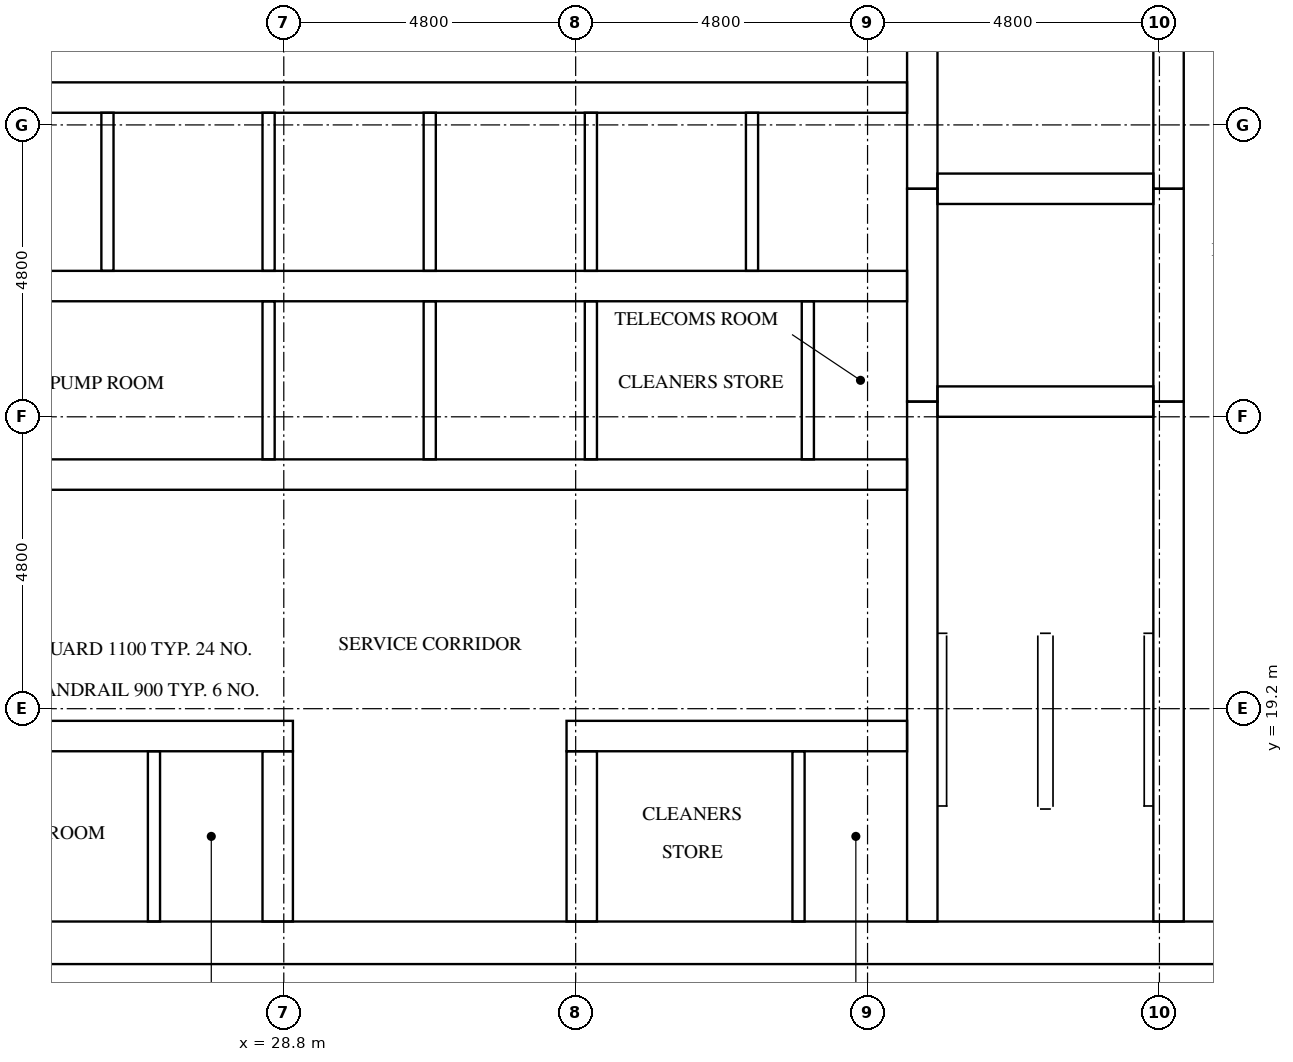
"""IFC4 building model, lengths in metres.
Left out: names, types, materials, properties, quantities, classifications, styles, units other than length and angle.
Written with IfcOpenShell. Run it as: python <this file> out.ifc"""

import sys

from ifc_helpers import new_model, si_unit, direction, frame, frame_2d, origin, place, context, subcontext, project, spatial, rectangle, extrude, element, fill, save


model = new_model("IFC4")
c1 = context("Model", 3, precision=1e-05, world=origin(), true_north=direction((0.0, 1.0)))
c2 = subcontext(c1, "Body", "Model", "MODEL_VIEW")
j1 = project(units=[si_unit("LENGTHUNIT", "METRE"), si_unit("PLANEANGLEUNIT", "RADIAN")], contexts=[c1])
p1 = place(None, origin())
s1 = spatial("IfcSite", under=j1, at=p1, CompositionType="ELEMENT")
p2 = place(p1, origin())
s2 = spatial("IfcBuilding", under=s1, at=p2, CompositionType="ELEMENT")
p3 = place(p2, frame((0.0, 0.0, 215.8)))
s3 = spatial("IfcBuildingStorey", under=s2, at=p3, CompositionType="ELEMENT", Elevation=215.8)
p4 = place(p3, frame((15.0, 15.35, 0.0), z_axis=(0.0, 0.0, 1.0), x_axis=(1.0, 0.0, 0.0)))
e1 = element("IfcWall", 1, at=p4, inside=s3, PredefinedType="SHEAR", context=c2, shape_type="SweptSolid", body=[
    extrude(rectangle(XDim=32.4, YDim=0.7, at=frame_2d((16.2, 0.0))), origin(), (0.0, 0.0, 1.0), 3.2),
])
p5 = place(p4, frame((15.3, 0.0, 0.0)))
e2 = element("IfcOpeningElement", 2, at=p5, cuts=e1, PredefinedType="OPENING", context=c2, shape_type="SweptSolid", body=[
    extrude(rectangle(XDim=1.8, YDim=2.1, at=frame_2d((0.9, 1.05))), frame((0.0, 0.36, 0.0), z_axis=(0.0, -1.0, 0.0), x_axis=(1.0, 0.0, 0.0)), (0.0, 0.0, 1.0), 0.72),
])
p6 = place(p3, frame((39.3, 15.7, 0.0), z_axis=(0.0, 0.0, 1.0), x_axis=(0.0, 1.0, 0.0)))
e3 = element("IfcWall", 3, at=p6, inside=s3, PredefinedType="SHEAR", context=c2, shape_type="SweptSolid", body=[
    extrude(rectangle(XDim=8.55, YDim=0.5, at=frame_2d((4.275, 0.0))), origin(), (0.0, 0.0, 1.0), 3.2),
])
p7 = place(p3, frame((39.3, 24.25, 0.0), z_axis=(0.0, 0.0, 1.0), x_axis=(0.0, 1.0, 0.0)))
e4 = element("IfcWall", 4, at=p7, inside=s3, PredefinedType="SHEAR", context=c2, shape_type="SweptSolid", body=[
    extrude(rectangle(XDim=3.5, YDim=0.5, at=frame_2d((1.75, 0.0))), origin(), (0.0, 0.0, 1.0), 3.2),
])
p8 = place(p3, frame((39.3, 27.75, 0.0), z_axis=(0.0, 0.0, 1.0), x_axis=(0.0, 1.0, 0.0)))
e5 = element("IfcWall", 5, at=p8, inside=s3, PredefinedType="SHEAR", context=c2, shape_type="SweptSolid", body=[
    extrude(rectangle(XDim=9.35, YDim=0.5, at=frame_2d((4.675, 0.0))), origin(), (0.0, 0.0, 1.0), 3.2),
])
p9 = place(p3, frame((43.35, 15.7, 0.0), z_axis=(0.0, 0.0, 1.0), x_axis=(0.0, 1.0, 0.0)))
e6 = element("IfcWall", 6, at=p9, inside=s3, PredefinedType="SHEAR", context=c2, shape_type="SweptSolid", body=[
    extrude(rectangle(XDim=8.55, YDim=0.5, at=frame_2d((4.275, 0.0))), origin(), (0.0, 0.0, 1.0), 3.2),
])
p10 = place(p9, frame((0.5, 0.0, 0.0)))
e7 = element("IfcOpeningElement", 7, at=p10, cuts=e6, PredefinedType="OPENING", context=c2, shape_type="SweptSolid", body=[
    extrude(rectangle(XDim=1.2, YDim=2.1, at=frame_2d((0.6, 1.05))), frame((0.0, 0.26, 0.0), z_axis=(0.0, -1.0, 0.0), x_axis=(1.0, 0.0, 0.0)), (0.0, 0.0, 1.0), 0.52),
])
p11 = place(p3, frame((43.35, 24.25, 0.0), z_axis=(0.0, 0.0, 1.0), x_axis=(0.0, 1.0, 0.0)))
e8 = element("IfcWall", 8, at=p11, inside=s3, PredefinedType="SHEAR", context=c2, shape_type="SweptSolid", body=[
    extrude(rectangle(XDim=3.5, YDim=0.5, at=frame_2d((1.75, 0.0))), origin(), (0.0, 0.0, 1.0), 3.2),
])
p12 = place(p11, frame((1.2, 0.0, 0.0)))
e9 = element("IfcOpeningElement", 9, at=p12, cuts=e8, PredefinedType="OPENING", context=c2, shape_type="SweptSolid", body=[
    extrude(rectangle(XDim=1.1, YDim=2.1, at=frame_2d((0.55, 1.05))), frame((0.0, 0.26, 0.0), z_axis=(0.0, -1.0, 0.0), x_axis=(1.0, 0.0, 0.0)), (0.0, 0.0, 1.0), 0.52),
])
p13 = place(p3, frame((43.35, 27.75, 0.0), z_axis=(0.0, 0.0, 1.0), x_axis=(0.0, 1.0, 0.0)))
e10 = element("IfcWall", 10, at=p13, inside=s3, PredefinedType="SHEAR", context=c2, shape_type="SweptSolid", body=[
    extrude(rectangle(XDim=9.35, YDim=0.5, at=frame_2d((4.675, 0.0))), origin(), (0.0, 0.0, 1.0), 3.2),
])
p14 = place(p13, frame((7.65, 0.0, 0.0)))
e11 = element("IfcOpeningElement", 11, at=p14, cuts=e10, PredefinedType="OPENING", context=c2, shape_type="SweptSolid", body=[
    extrude(rectangle(XDim=1.2, YDim=2.1, at=frame_2d((0.6, 1.05))), frame((0.0, 0.26, 0.0), z_axis=(0.0, -1.0, 0.0), x_axis=(1.0, 0.0, 0.0)), (0.0, 0.0, 1.0), 0.52),
])
for number, where, z_axis, x_axis in (
    (12, (39.55, 24.25, 0.0), (0.0, 0.0, 1.0), (1.0, 0.0, 0.0)),
    (13, (39.55, 27.75, 0.0), (0.0, 0.0, 1.0), (1.0, 0.0, 0.0)),
):
    element("IfcWall", number, at=place(p3, frame(where, z_axis=z_axis, x_axis=x_axis)), inside=s3, PredefinedType="SHEAR", context=c2, shape_type="SweptSolid", body=[
        extrude(rectangle(XDim=3.55, YDim=0.5, at=frame_2d((1.775, 0.0))), origin(), (0.0, 0.0, 1.0), 3.2),
    ])
p15 = place(p3, frame((23.35, 18.75, 0.0), z_axis=(0.0, 0.0, 1.0), x_axis=(1.0, 0.0, 0.0)))
e14 = element("IfcWall", 14, at=p15, inside=s3, PredefinedType="SHEAR", context=c2, shape_type="SweptSolid", body=[
    extrude(rectangle(XDim=5.6, YDim=0.5, at=frame_2d((2.8, 0.0))), origin(), (0.0, 0.0, 1.0), 3.2),
])
p16 = place(p15, frame((1.107, 0.0, 0.0)))
e15 = element("IfcOpeningElement", 15, at=p16, cuts=e14, PredefinedType="OPENING", context=c2, shape_type="SweptSolid", body=[
    extrude(rectangle(XDim=1.0, YDim=2.1, at=frame_2d((0.5, 1.05))), frame((0.0, 0.26, 0.0), z_axis=(0.0, -1.0, 0.0), x_axis=(1.0, 0.0, 0.0)), (0.0, 0.0, 1.0), 0.52),
])
p17 = place(p15, frame((3.758, 0.0, 0.0)))
e16 = element("IfcOpeningElement", 16, at=p17, cuts=e14, PredefinedType="OPENING", context=c2, shape_type="SweptSolid", body=[
    extrude(rectangle(XDim=1.0, YDim=2.1, at=frame_2d((0.5, 1.05))), frame((0.0, 0.26, 0.0), z_axis=(0.0, -1.0, 0.0), x_axis=(1.0, 0.0, 0.0)), (0.0, 0.0, 1.0), 0.52),
])
p18 = place(p3, frame((33.45, 18.75, 0.0), z_axis=(0.0, 0.0, 1.0), x_axis=(1.0, 0.0, 0.0)))
e17 = element("IfcWall", 17, at=p18, inside=s3, PredefinedType="SHEAR", context=c2, shape_type="SweptSolid", body=[
    extrude(rectangle(XDim=5.6, YDim=0.5, at=frame_2d((2.8, 0.0))), origin(), (0.0, 0.0, 1.0), 3.2),
])
p19 = place(p18, frame((1.607, 0.0, 0.0)))
e18 = element("IfcOpeningElement", 18, at=p19, cuts=e17, PredefinedType="OPENING", context=c2, shape_type="SweptSolid", body=[
    extrude(rectangle(XDim=1.0, YDim=2.1, at=frame_2d((0.5, 1.05))), frame((0.0, 0.26, 0.0), z_axis=(0.0, -1.0, 0.0), x_axis=(1.0, 0.0, 0.0)), (0.0, 0.0, 1.0), 0.52),
])
p20 = place(p18, frame((4.258, 0.0, 0.0)))
e19 = element("IfcOpeningElement", 19, at=p20, cuts=e17, PredefinedType="OPENING", context=c2, shape_type="SweptSolid", body=[
    extrude(rectangle(XDim=1.0, YDim=2.1, at=frame_2d((0.5, 1.05))), frame((0.0, 0.26, 0.0), z_axis=(0.0, -1.0, 0.0), x_axis=(1.0, 0.0, 0.0)), (0.0, 0.0, 1.0), 0.52),
])
p21 = place(p3, frame((23.35, 23.05, 0.0), z_axis=(0.0, 0.0, 1.0), x_axis=(1.0, 0.0, 0.0)))
e20 = element("IfcWall", 20, at=p21, inside=s3, PredefinedType="SHEAR", context=c2, shape_type="SweptSolid", body=[
    extrude(rectangle(XDim=15.7, YDim=0.5, at=frame_2d((7.85, 0.0))), origin(), (0.0, 0.0, 1.0), 3.2),
])
p22 = place(p21, frame((2.05, 0.0, 0.0)))
e21 = element("IfcOpeningElement", 21, at=p22, cuts=e20, PredefinedType="OPENING", context=c2, shape_type="SweptSolid", body=[
    extrude(rectangle(XDim=1.0, YDim=2.1, at=frame_2d((0.5, 1.05))), frame((0.0, 0.26, 0.0), z_axis=(0.0, -1.0, 0.0), x_axis=(1.0, 0.0, 0.0)), (0.0, 0.0, 1.0), 0.52),
])
p23 = place(p21, frame((11.784, 0.0, 0.0)))
e22 = element("IfcOpeningElement", 22, at=p23, cuts=e20, PredefinedType="OPENING", context=c2, shape_type="SweptSolid", body=[
    extrude(rectangle(XDim=1.0, YDim=2.1, at=frame_2d((0.5, 1.05))), frame((0.0, 0.26, 0.0), z_axis=(0.0, -1.0, 0.0), x_axis=(1.0, 0.0, 0.0)), (0.0, 0.0, 1.0), 0.52),
])
p24 = place(p21, frame((14.434, 0.0, 0.0)))
e23 = element("IfcOpeningElement", 23, at=p24, cuts=e20, PredefinedType="OPENING", context=c2, shape_type="SweptSolid", body=[
    extrude(rectangle(XDim=1.0, YDim=2.1, at=frame_2d((0.5, 1.05))), frame((0.0, 0.26, 0.0), z_axis=(0.0, -1.0, 0.0), x_axis=(1.0, 0.0, 0.0)), (0.0, 0.0, 1.0), 0.52),
])
p25 = place(p3, frame((23.35, 26.15, 0.0), z_axis=(0.0, 0.0, 1.0), x_axis=(1.0, 0.0, 0.0)))
e24 = element("IfcWall", 24, at=p25, inside=s3, PredefinedType="SHEAR", context=c2, shape_type="SweptSolid", body=[
    extrude(rectangle(XDim=15.7, YDim=0.5, at=frame_2d((7.85, 0.0))), origin(), (0.0, 0.0, 1.0), 3.2),
])
p26 = place(p3, frame((23.35, 29.25, 0.0), z_axis=(0.0, 0.0, 1.0), x_axis=(1.0, 0.0, 0.0)))
e25 = element("IfcWall", 25, at=p26, inside=s3, PredefinedType="SHEAR", context=c2, shape_type="SweptSolid", body=[
    extrude(rectangle(XDim=15.7, YDim=0.5, at=frame_2d((7.85, 0.0))), origin(), (0.0, 0.0, 1.0), 3.2),
])
p27 = place(p26, frame((0.675, 0.0, 0.0)))
e26 = element("IfcOpeningElement", 26, at=p27, cuts=e25, PredefinedType="OPENING", context=c2, shape_type="SweptSolid", body=[
    extrude(rectangle(XDim=1.1, YDim=2.1, at=frame_2d((0.55, 1.05))), frame((0.0, 0.26, 0.0), z_axis=(0.0, -1.0, 0.0), x_axis=(1.0, 0.0, 0.0)), (0.0, 0.0, 1.0), 0.52),
])
p28 = place(p26, frame((3.325, 0.0, 0.0)))
e27 = element("IfcOpeningElement", 27, at=p28, cuts=e25, PredefinedType="OPENING", context=c2, shape_type="SweptSolid", body=[
    extrude(rectangle(XDim=1.1, YDim=2.1, at=frame_2d((0.55, 1.05))), frame((0.0, 0.26, 0.0), z_axis=(0.0, -1.0, 0.0), x_axis=(1.0, 0.0, 0.0)), (0.0, 0.0, 1.0), 0.52),
])
p29 = place(p26, frame((5.975, 0.0, 0.0)))
e28 = element("IfcOpeningElement", 28, at=p29, cuts=e25, PredefinedType="OPENING", context=c2, shape_type="SweptSolid", body=[
    extrude(rectangle(XDim=1.1, YDim=2.1, at=frame_2d((0.55, 1.05))), frame((0.0, 0.26, 0.0), z_axis=(0.0, -1.0, 0.0), x_axis=(1.0, 0.0, 0.0)), (0.0, 0.0, 1.0), 0.52),
])
p30 = place(p26, frame((8.625, 0.0, 0.0)))
e29 = element("IfcOpeningElement", 29, at=p30, cuts=e25, PredefinedType="OPENING", context=c2, shape_type="SweptSolid", body=[
    extrude(rectangle(XDim=1.1, YDim=2.1, at=frame_2d((0.55, 1.05))), frame((0.0, 0.26, 0.0), z_axis=(0.0, -1.0, 0.0), x_axis=(1.0, 0.0, 0.0)), (0.0, 0.0, 1.0), 0.52),
])
p31 = place(p26, frame((11.275, 0.0, 0.0)))
e30 = element("IfcOpeningElement", 30, at=p31, cuts=e25, PredefinedType="OPENING", context=c2, shape_type="SweptSolid", body=[
    extrude(rectangle(XDim=1.1, YDim=2.1, at=frame_2d((0.55, 1.05))), frame((0.0, 0.26, 0.0), z_axis=(0.0, -1.0, 0.0), x_axis=(1.0, 0.0, 0.0)), (0.0, 0.0, 1.0), 0.52),
])
p32 = place(p26, frame((13.925, 0.0, 0.0)))
e31 = element("IfcOpeningElement", 31, at=p32, cuts=e25, PredefinedType="OPENING", context=c2, shape_type="SweptSolid", body=[
    extrude(rectangle(XDim=1.1, YDim=2.1, at=frame_2d((0.55, 1.05))), frame((0.0, 0.26, 0.0), z_axis=(0.0, -1.0, 0.0), x_axis=(1.0, 0.0, 0.0)), (0.0, 0.0, 1.0), 0.52),
])
for number, where, z_axis, x_axis in (
    (32, (28.7, 15.7, 0.0), (0.0, 0.0, 1.0), (0.0, 1.0, 0.0)),
    (33, (33.7, 15.7, 0.0), (0.0, 0.0, 1.0), (0.0, 1.0, 0.0)),
):
    element("IfcWall", number, at=place(p3, frame(where, z_axis=z_axis, x_axis=x_axis)), inside=s3, PredefinedType="SHEAR", context=c2, shape_type="SweptSolid", body=[
        extrude(rectangle(XDim=2.8, YDim=0.5, at=frame_2d((1.4, 0.0))), origin(), (0.0, 0.0, 1.0), 3.2),
    ])
p33 = place(p3, frame((25.9, 26.4, 0.0), z_axis=(0.0, 0.0, 1.0), x_axis=(0.0, 1.0, 0.0)))
e34 = element("IfcWall", 34, at=p33, inside=s3, PredefinedType="SOLIDWALL", context=c2, shape_type="SweptSolid", body=[
    extrude(rectangle(XDim=2.6, YDim=0.2, at=frame_2d((1.3, 0.0))), origin(), (0.0, 0.0, 1.0), 3.2),
])
p34 = place(p3, frame((28.55, 23.3, 0.0), z_axis=(0.0, 0.0, 1.0), x_axis=(0.0, 1.0, 0.0)))
e35 = element("IfcWall", 35, at=p34, inside=s3, PredefinedType="SOLIDWALL", context=c2, shape_type="SweptSolid", body=[
    extrude(rectangle(XDim=2.6, YDim=0.2, at=frame_2d((1.3, 0.0))), origin(), (0.0, 0.0, 1.0), 3.2),
])
p35 = place(p3, frame((28.55, 26.4, 0.0), z_axis=(0.0, 0.0, 1.0), x_axis=(0.0, 1.0, 0.0)))
e36 = element("IfcWall", 36, at=p35, inside=s3, PredefinedType="SOLIDWALL", context=c2, shape_type="SweptSolid", body=[
    extrude(rectangle(XDim=2.6, YDim=0.2, at=frame_2d((1.3, 0.0))), origin(), (0.0, 0.0, 1.0), 3.2),
])
p36 = place(p3, frame((31.2, 23.3, 0.0), z_axis=(0.0, 0.0, 1.0), x_axis=(0.0, 1.0, 0.0)))
e37 = element("IfcWall", 37, at=p36, inside=s3, PredefinedType="SOLIDWALL", context=c2, shape_type="SweptSolid", body=[
    extrude(rectangle(XDim=2.6, YDim=0.2, at=frame_2d((1.3, 0.0))), origin(), (0.0, 0.0, 1.0), 3.2),
])
p37 = place(p3, frame((31.2, 26.4, 0.0), z_axis=(0.0, 0.0, 1.0), x_axis=(0.0, 1.0, 0.0)))
e38 = element("IfcWall", 38, at=p37, inside=s3, PredefinedType="SOLIDWALL", context=c2, shape_type="SweptSolid", body=[
    extrude(rectangle(XDim=2.6, YDim=0.2, at=frame_2d((1.3, 0.0))), origin(), (0.0, 0.0, 1.0), 3.2),
])
p38 = place(p3, frame((33.85, 23.3, 0.0), z_axis=(0.0, 0.0, 1.0), x_axis=(0.0, 1.0, 0.0)))
e39 = element("IfcWall", 39, at=p38, inside=s3, PredefinedType="SOLIDWALL", context=c2, shape_type="SweptSolid", body=[
    extrude(rectangle(XDim=2.6, YDim=0.2, at=frame_2d((1.3, 0.0))), origin(), (0.0, 0.0, 1.0), 3.2),
])
for number, where, z_axis, x_axis in (
    (40, (33.85, 26.4, 0.0), (0.0, 0.0, 1.0), (0.0, 1.0, 0.0)),
    (41, (36.5, 26.4, 0.0), (0.0, 0.0, 1.0), (0.0, 1.0, 0.0)),
):
    element("IfcWall", number, at=place(p3, frame(where, z_axis=z_axis, x_axis=x_axis)), inside=s3, PredefinedType="SOLIDWALL", context=c2, shape_type="SweptSolid", body=[
        extrude(rectangle(XDim=2.6, YDim=0.2, at=frame_2d((1.3, 0.0))), origin(), (0.0, 0.0, 1.0), 3.2),
    ])
p39 = place(p3, frame((37.418, 23.3, 0.0), z_axis=(0.0, 0.0, 1.0), x_axis=(0.0, 1.0, 0.0)))
e42 = element("IfcWall", 42, at=p39, inside=s3, PredefinedType="PARTITIONING", context=c2, shape_type="SweptSolid", body=[
    extrude(rectangle(XDim=2.6, YDim=0.2, at=frame_2d((1.3, 0.0))), origin(), (0.0, 0.0, 1.0), 3.2),
])
for number, where, z_axis, x_axis in (
    (43, (26.665, 15.7, 0.0), (0.0, 0.0, 1.0), (0.0, 1.0, 0.0)),
    (44, (37.265, 15.7, 0.0), (0.0, 0.0, 1.0), (0.0, 1.0, 0.0)),
):
    element("IfcWall", number, at=place(p3, frame(where, z_axis=z_axis, x_axis=x_axis)), inside=s3, PredefinedType="PARTITIONING", context=c2, shape_type="SweptSolid", body=[
        extrude(rectangle(XDim=2.8, YDim=0.2, at=frame_2d((1.4, 0.0))), origin(), (0.0, 0.0, 1.0), 3.2),
    ])
p40 = place(p27, origin())
e45 = element("IfcDoor", 45, at=p40, inside=s3, OperationType="DOUBLE_DOOR_SLIDING", PredefinedType="DOOR", context=c2, shape_type="SweptSolid", body=[
    extrude(rectangle(XDim=1.1, YDim=2.1, at=frame_2d((0.55, 1.05))), frame((0.0, 0.025, 0.0), z_axis=(0.0, -1.0, 0.0), x_axis=(1.0, 0.0, 0.0)), (0.0, 0.0, 1.0), 0.05),
])
fill(e26, e45)
p41 = place(p28, origin())
e46 = element("IfcDoor", 46, at=p41, inside=s3, OperationType="DOUBLE_DOOR_SLIDING", PredefinedType="DOOR", context=c2, shape_type="SweptSolid", body=[
    extrude(rectangle(XDim=1.1, YDim=2.1, at=frame_2d((0.55, 1.05))), frame((0.0, 0.025, 0.0), z_axis=(0.0, -1.0, 0.0), x_axis=(1.0, 0.0, 0.0)), (0.0, 0.0, 1.0), 0.05),
])
fill(e27, e46)
p42 = place(p29, origin())
e47 = element("IfcDoor", 47, at=p42, inside=s3, OperationType="DOUBLE_DOOR_SLIDING", PredefinedType="DOOR", context=c2, shape_type="SweptSolid", body=[
    extrude(rectangle(XDim=1.1, YDim=2.1, at=frame_2d((0.55, 1.05))), frame((0.0, 0.025, 0.0), z_axis=(0.0, -1.0, 0.0), x_axis=(1.0, 0.0, 0.0)), (0.0, 0.0, 1.0), 0.05),
])
fill(e28, e47)
p43 = place(p30, origin())
e48 = element("IfcDoor", 48, at=p43, inside=s3, OperationType="DOUBLE_DOOR_SLIDING", PredefinedType="DOOR", context=c2, shape_type="SweptSolid", body=[
    extrude(rectangle(XDim=1.1, YDim=2.1, at=frame_2d((0.55, 1.05))), frame((0.0, 0.025, 0.0), z_axis=(0.0, -1.0, 0.0), x_axis=(1.0, 0.0, 0.0)), (0.0, 0.0, 1.0), 0.05),
])
fill(e29, e48)
p44 = place(p31, origin())
e49 = element("IfcDoor", 49, at=p44, inside=s3, OperationType="DOUBLE_DOOR_SLIDING", PredefinedType="DOOR", context=c2, shape_type="SweptSolid", body=[
    extrude(rectangle(XDim=1.1, YDim=2.1, at=frame_2d((0.55, 1.05))), frame((0.0, 0.025, 0.0), z_axis=(0.0, -1.0, 0.0), x_axis=(1.0, 0.0, 0.0)), (0.0, 0.0, 1.0), 0.05),
])
fill(e30, e49)
p45 = place(p32, origin())
e50 = element("IfcDoor", 50, at=p45, inside=s3, OperationType="DOUBLE_DOOR_SLIDING", PredefinedType="DOOR", context=c2, shape_type="SweptSolid", body=[
    extrude(rectangle(XDim=1.1, YDim=2.1, at=frame_2d((0.55, 1.05))), frame((0.0, 0.025, 0.0), z_axis=(0.0, -1.0, 0.0), x_axis=(1.0, 0.0, 0.0)), (0.0, 0.0, 1.0), 0.05),
])
fill(e31, e50)
p46 = place(p12, origin())
e51 = element("IfcDoor", 51, at=p46, inside=s3, OperationType="DOUBLE_DOOR_SLIDING", PredefinedType="DOOR", context=c2, shape_type="SweptSolid", body=[
    extrude(rectangle(XDim=1.1, YDim=2.1, at=frame_2d((0.55, 1.05))), frame((0.0, 0.025, 0.0), z_axis=(0.0, -1.0, 0.0), x_axis=(1.0, 0.0, 0.0)), (0.0, 0.0, 1.0), 0.05),
])
fill(e9, e51)
p47 = place(p10, origin())
e52 = element("IfcDoor", 52, at=p47, inside=s3, OperationType="SINGLE_SWING_LEFT", PredefinedType="DOOR", context=c2, shape_type="SweptSolid", body=[
    extrude(rectangle(XDim=1.2, YDim=2.1, at=frame_2d((0.6, 1.05))), frame((0.0, 0.025, 0.0), z_axis=(0.0, -1.0, 0.0), x_axis=(1.0, 0.0, 0.0)), (0.0, 0.0, 1.0), 0.05),
])
fill(e7, e52)
p48 = place(p5, frame((1.8, 0.0, 0.0), z_axis=(0.0, 0.0, 1.0), x_axis=(-1.0, 0.0, 0.0)))
e53 = element("IfcDoor", 53, at=p48, inside=s3, OperationType="DOUBLE_DOOR_SINGLE_SWING", PredefinedType="DOOR", context=c2, shape_type="SweptSolid", body=[
    extrude(rectangle(XDim=1.8, YDim=2.1, at=frame_2d((0.9, 1.05))), frame((0.0, 0.025, 0.0), z_axis=(0.0, -1.0, 0.0), x_axis=(1.0, 0.0, 0.0)), (0.0, 0.0, 1.0), 0.05),
])
fill(e2, e53)
p49 = place(p22, frame((1.0, 0.0, 0.0), z_axis=(0.0, 0.0, 1.0), x_axis=(-1.0, 0.0, 0.0)))
e54 = element("IfcDoor", 54, at=p49, inside=s3, OperationType="SINGLE_SWING_LEFT", PredefinedType="DOOR", context=c2, shape_type="SweptSolid", body=[
    extrude(rectangle(XDim=1.0, YDim=2.1, at=frame_2d((0.5, 1.05))), frame((0.0, 0.025, 0.0), z_axis=(0.0, -1.0, 0.0), x_axis=(1.0, 0.0, 0.0)), (0.0, 0.0, 1.0), 0.05),
])
fill(e21, e54)
p50 = place(p23, frame((1.0, 0.0, 0.0), z_axis=(0.0, 0.0, 1.0), x_axis=(-1.0, 0.0, 0.0)))
e55 = element("IfcDoor", 55, at=p50, inside=s3, OperationType="SINGLE_SWING_RIGHT", PredefinedType="DOOR", context=c2, shape_type="SweptSolid", body=[
    extrude(rectangle(XDim=1.0, YDim=2.1, at=frame_2d((0.5, 1.05))), frame((0.0, 0.025, 0.0), z_axis=(0.0, -1.0, 0.0), x_axis=(1.0, 0.0, 0.0)), (0.0, 0.0, 1.0), 0.05),
])
fill(e22, e55)
p51 = place(p24, frame((1.0, 0.0, 0.0), z_axis=(0.0, 0.0, 1.0), x_axis=(-1.0, 0.0, 0.0)))
e56 = element("IfcDoor", 56, at=p51, inside=s3, OperationType="SINGLE_SWING_LEFT", PredefinedType="DOOR", context=c2, shape_type="SweptSolid", body=[
    extrude(rectangle(XDim=1.0, YDim=2.1, at=frame_2d((0.5, 1.05))), frame((0.0, 0.025, 0.0), z_axis=(0.0, -1.0, 0.0), x_axis=(1.0, 0.0, 0.0)), (0.0, 0.0, 1.0), 0.05),
])
fill(e23, e56)
p52 = place(p16, origin())
e57 = element("IfcDoor", 57, at=p52, inside=s3, OperationType="SINGLE_SWING_RIGHT", PredefinedType="DOOR", context=c2, shape_type="SweptSolid", body=[
    extrude(rectangle(XDim=1.0, YDim=2.1, at=frame_2d((0.5, 1.05))), frame((0.0, 0.025, 0.0), z_axis=(0.0, -1.0, 0.0), x_axis=(1.0, 0.0, 0.0)), (0.0, 0.0, 1.0), 0.05),
])
fill(e15, e57)
p53 = place(p17, origin())
e58 = element("IfcDoor", 58, at=p53, inside=s3, OperationType="SINGLE_SWING_LEFT", PredefinedType="DOOR", context=c2, shape_type="SweptSolid", body=[
    extrude(rectangle(XDim=1.0, YDim=2.1, at=frame_2d((0.5, 1.05))), frame((0.0, 0.025, 0.0), z_axis=(0.0, -1.0, 0.0), x_axis=(1.0, 0.0, 0.0)), (0.0, 0.0, 1.0), 0.05),
])
fill(e16, e58)
p54 = place(p19, origin())
e59 = element("IfcDoor", 59, at=p54, inside=s3, OperationType="SINGLE_SWING_RIGHT", PredefinedType="DOOR", context=c2, shape_type="SweptSolid", body=[
    extrude(rectangle(XDim=1.0, YDim=2.1, at=frame_2d((0.5, 1.05))), frame((0.0, 0.025, 0.0), z_axis=(0.0, -1.0, 0.0), x_axis=(1.0, 0.0, 0.0)), (0.0, 0.0, 1.0), 0.05),
])
fill(e18, e59)
p55 = place(p20, origin())
e60 = element("IfcDoor", 60, at=p55, inside=s3, OperationType="SINGLE_SWING_LEFT", PredefinedType="DOOR", context=c2, shape_type="SweptSolid", body=[
    extrude(rectangle(XDim=1.0, YDim=2.1, at=frame_2d((0.5, 1.05))), frame((0.0, 0.025, 0.0), z_axis=(0.0, -1.0, 0.0), x_axis=(1.0, 0.0, 0.0)), (0.0, 0.0, 1.0), 0.05),
])
fill(e19, e60)
save(model, sys.argv[1])
